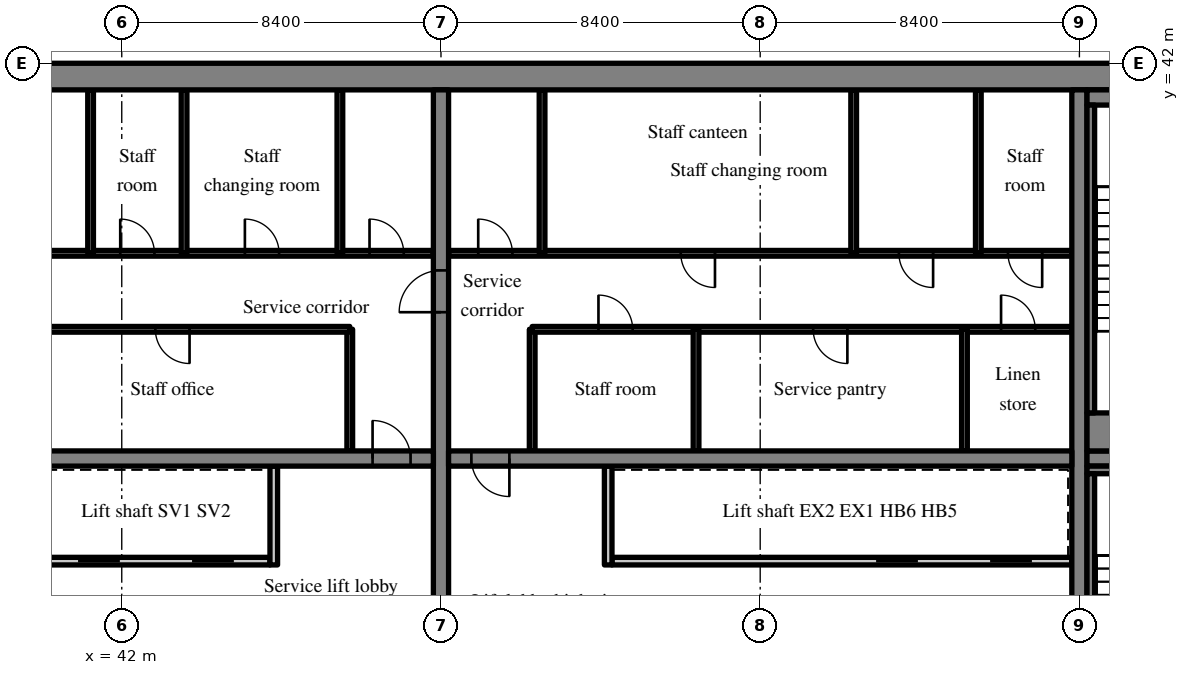
"""IFC4 building model, lengths in metres.
Left out: names, types, materials, properties, quantities, classifications, styles, units other than length and angle.
Written with IfcOpenShell. Run it as: python <this file> out.ifc"""

import sys

from ifc_helpers import new_model, si_unit, direction, frame, frame_2d, origin, place, context, subcontext, project, spatial, rectangle, extrude, source, transform, mapped, element, fill, save


model = new_model("IFC4")
c1 = context("Model", 3, precision=1e-05, world=origin(), true_north=direction((0.0, 1.0)))
c2 = subcontext(c1, "Body", "Model", "MODEL_VIEW")
j1 = project(units=[si_unit("LENGTHUNIT", "METRE"), si_unit("PLANEANGLEUNIT", "RADIAN")], contexts=[c1])
p1 = place(None, origin())
s1 = spatial("IfcSite", under=j1, at=p1, CompositionType="ELEMENT")
p2 = place(p1, origin())
s2 = spatial("IfcBuilding", under=s1, at=p2, CompositionType="ELEMENT")
p3 = place(p2, frame((0.0, 0.0, 166.8)))
s3 = spatial("IfcBuildingStorey", under=s2, at=p3, CompositionType="ELEMENT", Elevation=166.8)
m1 = source(origin(), c2, "Body", "SweptSolid", [
    extrude(rectangle(XDim=50.4, YDim=0.7, at=frame_2d((25.2, 0.0))), origin(), (0.0, 0.0, 1.0), 3.52),
])
p4 = place(p3, frame((25.2, 41.65, 0.0), z_axis=(0.0, 0.0, 1.0), x_axis=(1.0, 0.0, 0.0)))
e1 = element("IfcWall", 1, at=p4, inside=s3, PredefinedType="SHEAR", context=c2, shape_type="MappedRepresentation", body=[
    mapped(m1, transform((0.0, 0.0, 0.0), scale=1.0)),
])
m2 = source(origin(), c2, "Body", "SweptSolid", [
    extrude(rectangle(XDim=18.6, YDim=0.4, at=frame_2d((9.3, 0.0))), origin(), (0.0, 0.0, 1.0), 3.52),
])
p5 = place(p3, frame((50.4, 22.7, 0.0), z_axis=(0.0, 0.0, 1.0), x_axis=(0.0, 1.0, 0.0)))
e2 = element("IfcWall", 2, at=p5, inside=s3, PredefinedType="SHEAR", context=c2, shape_type="MappedRepresentation", body=[
    mapped(m2, transform((0.0, 0.0, 0.0), scale=1.0)),
])
m3 = source(origin(), c2, "Body", "SweptSolid", [
    extrude(rectangle(XDim=1.1, YDim=2.1, at=frame_2d((0.55, 1.05))), frame((0.0, 0.21, 0.0), z_axis=(0.0, -1.0, 0.0), x_axis=(1.0, 0.0, 0.0)), (0.0, 0.0, 1.0), 0.42),
])
p6 = place(p5, frame((12.75, 0.0, 0.0)))
e3 = element("IfcOpeningElement", 3, at=p6, cuts=e2, PredefinedType="OPENING", context=c2, shape_type="MappedRepresentation", body=[
    mapped(m3, transform((0.0, 0.0, 0.0), scale=1.0)),
])
p7 = place(p3, frame((67.2, 22.7, 0.0), z_axis=(0.0, 0.0, 1.0), x_axis=(0.0, 1.0, 0.0)))
e4 = element("IfcWall", 4, at=p7, inside=s3, PredefinedType="SHEAR", context=c2, shape_type="MappedRepresentation", body=[
    mapped(m2, transform((0.0, 0.0, 0.0), scale=1.0)),
])
m4 = source(origin(), c2, "Body", "SweptSolid", [
    extrude(rectangle(XDim=16.4, YDim=0.4, at=frame_2d((8.2, 0.0))), origin(), (0.0, 0.0, 1.0), 3.52),
])
p8 = place(p3, frame((33.8, 31.6, 0.0), z_axis=(0.0, 0.0, 1.0), x_axis=(1.0, 0.0, 0.0)))
e5 = element("IfcWall", 5, at=p8, inside=s3, PredefinedType="SHEAR", context=c2, shape_type="MappedRepresentation", body=[
    mapped(m4, transform((0.0, 0.0, 0.0), scale=1.0)),
])
m5 = source(origin(), c2, "Body", "SweptSolid", [
    extrude(rectangle(XDim=1.0, YDim=2.1, at=frame_2d((0.5, 1.05))), frame((0.0, 0.21, 0.0), z_axis=(0.0, -1.0, 0.0), x_axis=(1.0, 0.0, 0.0)), (0.0, 0.0, 1.0), 0.42),
])
p9 = place(p8, frame((14.8, 0.0, 0.0)))
e6 = element("IfcOpeningElement", 6, at=p9, cuts=e5, PredefinedType="OPENING", context=c2, shape_type="MappedRepresentation", body=[
    mapped(m5, transform((0.0, 0.0, 0.0), scale=1.0)),
])
p10 = place(p3, frame((50.6, 31.6, 0.0), z_axis=(0.0, 0.0, 1.0), x_axis=(1.0, 0.0, 0.0)))
e7 = element("IfcWall", 7, at=p10, inside=s3, PredefinedType="SHEAR", context=c2, shape_type="MappedRepresentation", body=[
    mapped(m4, transform((0.0, 0.0, 0.0), scale=1.0)),
])
p11 = place(p10, frame((0.6, 0.0, 0.0)))
e8 = element("IfcOpeningElement", 8, at=p11, cuts=e7, PredefinedType="OPENING", context=c2, shape_type="MappedRepresentation", body=[
    mapped(m5, transform((0.0, 0.0, 0.0), scale=1.0)),
])
m6 = source(origin(), c2, "Body", "SweptSolid", [
    extrude(rectangle(XDim=7.5, YDim=0.4, at=frame_2d((3.75, 0.0))), origin(), (0.0, 0.0, 1.0), 3.52),
])
p12 = place(p3, frame((67.4, 31.6, 0.0), z_axis=(0.0, 0.0, 1.0), x_axis=(1.0, 0.0, 0.0)))
e9 = element("IfcWall", 9, at=p12, inside=s3, PredefinedType="SHEAR", context=c2, shape_type="MappedRepresentation", body=[
    mapped(m6, transform((0.0, 0.0, 0.0), scale=1.0)),
])
p13 = place(p12, frame((5.725, 0.0, 0.0)))
e10 = element("IfcOpeningElement", 10, at=p13, cuts=e9, PredefinedType="OPENING", context=c2, shape_type="MappedRepresentation", body=[
    mapped(m3, transform((0.0, 0.0, 0.0), scale=1.0)),
])
m7 = source(origin(), c2, "Body", "SweptSolid", [
    extrude(rectangle(XDim=6.0, YDim=0.2, at=frame_2d((3.0, 0.0))), origin(), (0.0, 0.0, 1.0), 3.52),
])
p14 = place(p3, frame((39.9, 28.9, 0.0), z_axis=(0.0, 0.0, 1.0), x_axis=(1.0, 0.0, 0.0)))
e11 = element("IfcWall", 11, at=p14, inside=s3, PredefinedType="SOLIDWALL", context=c2, shape_type="MappedRepresentation", body=[
    mapped(m7, transform((0.0, 0.0, 0.0), scale=1.0)),
])
m8 = source(origin(), c2, "Body", "SweptSolid", [
    extrude(rectangle(XDim=1.1, YDim=2.1, at=frame_2d((0.55, 1.05))), frame((0.0, 0.11, 0.0), z_axis=(0.0, -1.0, 0.0), x_axis=(1.0, 0.0, 0.0)), (0.0, 0.0, 1.0), 0.22),
])
p15 = place(p14, frame((0.95, 0.0, 0.0)))
e12 = element("IfcOpeningElement", 12, at=p15, cuts=e11, PredefinedType="OPENING", context=c2, shape_type="MappedRepresentation", body=[
    mapped(m8, transform((0.0, 0.0, 0.0), scale=1.0)),
])
p16 = place(p14, frame((3.95, 0.0, 0.0)))
e13 = element("IfcOpeningElement", 13, at=p16, cuts=e11, PredefinedType="OPENING", context=c2, shape_type="MappedRepresentation", body=[
    mapped(m8, transform((0.0, 0.0, 0.0), scale=1.0)),
])
m9 = source(origin(), c2, "Body", "SweptSolid", [
    extrude(rectangle(XDim=2.6, YDim=0.2, at=frame_2d((1.3, 0.0))), origin(), (0.0, 0.0, 1.0), 3.52),
])
p17 = place(p3, frame((46.0, 28.8, 0.0), z_axis=(0.0, 0.0, 1.0), x_axis=(0.0, 1.0, 0.0)))
e14 = element("IfcWall", 14, at=p17, inside=s3, PredefinedType="SOLIDWALL", context=c2, shape_type="MappedRepresentation", body=[
    mapped(m9, transform((0.0, 0.0, 0.0), scale=1.0)),
])
m10 = source(origin(), c2, "Body", "SweptSolid", [
    extrude(rectangle(XDim=3.2, YDim=0.15, at=frame_2d((1.6, 0.0))), origin(), (0.0, 0.0, 1.0), 3.52),
])
p18 = place(p3, frame((48.0, 31.8, 0.0), z_axis=(0.0, 0.0, 1.0), x_axis=(0.0, 1.0, 0.0)))
e15 = element("IfcWall", 15, at=p18, inside=s3, PredefinedType="PARTITIONING", context=c2, shape_type="MappedRepresentation", body=[
    mapped(m10, transform((0.0, 0.0, 0.0), scale=1.0)),
])
m11 = source(origin(), c2, "Body", "SweptSolid", [
    extrude(rectangle(XDim=14.2, YDim=0.15, at=frame_2d((7.1, 0.0))), origin(), (0.0, 0.0, 1.0), 3.52),
])
p19 = place(p3, frame((33.8, 35.0, 0.0), z_axis=(0.0, 0.0, 1.0), x_axis=(1.0, 0.0, 0.0)))
e16 = element("IfcWall", 16, at=p19, inside=s3, PredefinedType="PARTITIONING", context=c2, shape_type="MappedRepresentation", body=[
    mapped(m11, transform((0.0, 0.0, 0.0), scale=1.0)),
])
m12 = source(origin(), c2, "Body", "SweptSolid", [
    extrude(rectangle(XDim=0.9, YDim=2.1, at=frame_2d((0.45, 1.05))), frame((0.0, 0.085, 0.0), z_axis=(0.0, -1.0, 0.0), x_axis=(1.0, 0.0, 0.0)), (0.0, 0.0, 1.0), 0.17),
])
p20 = place(p19, frame((2.022, 0.0, 0.0)))
e17 = element("IfcOpeningElement", 17, at=p20, cuts=e16, PredefinedType="OPENING", context=c2, shape_type="MappedRepresentation", body=[
    mapped(m12, transform((0.0, 0.0, 0.0), scale=1.0)),
])
p21 = place(p19, frame((9.084, 0.0, 0.0)))
e18 = element("IfcOpeningElement", 18, at=p21, cuts=e16, PredefinedType="OPENING", context=c2, shape_type="MappedRepresentation", body=[
    mapped(m12, transform((0.0, 0.0, 0.0), scale=1.0)),
])
m13 = source(origin(), c2, "Body", "SweptSolid", [
    extrude(rectangle(XDim=16.4, YDim=0.15, at=frame_2d((8.2, 0.0))), origin(), (0.0, 0.0, 1.0), 3.52),
])
p22 = place(p3, frame((33.8, 37.0, 0.0), z_axis=(0.0, 0.0, 1.0), x_axis=(1.0, 0.0, 0.0)))
e19 = element("IfcWall", 19, at=p22, inside=s3, PredefinedType="PARTITIONING", context=c2, shape_type="MappedRepresentation", body=[
    mapped(m13, transform((0.0, 0.0, 0.0), scale=1.0)),
])
p23 = place(p22, frame((3.24, 0.0, 0.0)))
e20 = element("IfcOpeningElement", 20, at=p23, cuts=e19, PredefinedType="OPENING", context=c2, shape_type="MappedRepresentation", body=[
    mapped(m12, transform((0.0, 0.0, 0.0), scale=1.0)),
])
p24 = place(p22, frame((8.16, 0.0, 0.0)))
e21 = element("IfcOpeningElement", 21, at=p24, cuts=e19, PredefinedType="OPENING", context=c2, shape_type="MappedRepresentation", body=[
    mapped(m12, transform((0.0, 0.0, 0.0), scale=1.0)),
])
p25 = place(p22, frame((11.44, 0.0, 0.0)))
e22 = element("IfcOpeningElement", 22, at=p25, cuts=e19, PredefinedType="OPENING", context=c2, shape_type="MappedRepresentation", body=[
    mapped(m12, transform((0.0, 0.0, 0.0), scale=1.0)),
])
p26 = place(p22, frame((14.72, 0.0, 0.0)))
e23 = element("IfcOpeningElement", 23, at=p26, cuts=e19, PredefinedType="OPENING", context=c2, shape_type="MappedRepresentation", body=[
    mapped(m12, transform((0.0, 0.0, 0.0), scale=1.0)),
])
m14 = source(origin(), c2, "Body", "SweptSolid", [
    extrude(rectangle(XDim=4.3, YDim=0.15, at=frame_2d((2.15, 0.0))), origin(), (0.0, 0.0, 1.0), 3.52),
])
for number, where, z_axis, x_axis in (
    (24, (41.18, 37.0, 0.0), (0.0, 0.0, 1.0), (0.0, 1.0, 0.0)),
    (25, (43.64, 37.0, 0.0), (0.0, 0.0, 1.0), (0.0, 1.0, 0.0)),
    (26, (47.74, 37.0, 0.0), (0.0, 0.0, 1.0), (0.0, 1.0, 0.0)),
):
    element("IfcWall", number, at=place(p3, frame(where, z_axis=z_axis, x_axis=x_axis)), inside=s3, PredefinedType="PARTITIONING", context=c2, shape_type="MappedRepresentation", body=[
        mapped(m14, transform((0.0, 0.0, 0.0), scale=1.0)),
    ])
m15 = source(origin(), c2, "Body", "SweptSolid", [
    extrude(rectangle(XDim=12.1, YDim=0.2, at=frame_2d((6.05, 0.0))), origin(), (0.0, 0.0, 1.0), 3.52),
])
p27 = place(p3, frame((67.0, 28.9, 0.0), z_axis=(0.0, 0.0, 1.0), x_axis=(-1.0, 0.0, 0.0)))
e27 = element("IfcWall", 27, at=p27, inside=s3, PredefinedType="SOLIDWALL", context=c2, shape_type="MappedRepresentation", body=[
    mapped(m15, transform((0.0, 0.0, 0.0), scale=1.0)),
])
p28 = place(p27, frame((1.05, 0.0, 0.0)))
e28 = element("IfcOpeningElement", 28, at=p28, cuts=e27, PredefinedType="OPENING", context=c2, shape_type="MappedRepresentation", body=[
    mapped(m8, transform((0.0, 0.0, 0.0), scale=1.0)),
])
p29 = place(p27, frame((4.05, 0.0, 0.0)))
e29 = element("IfcOpeningElement", 29, at=p29, cuts=e27, PredefinedType="OPENING", context=c2, shape_type="MappedRepresentation", body=[
    mapped(m8, transform((0.0, 0.0, 0.0), scale=1.0)),
])
p30 = place(p3, frame((54.8, 28.8, 0.0), z_axis=(0.0, 0.0, 1.0), x_axis=(0.0, 1.0, 0.0)))
e30 = element("IfcWall", 30, at=p30, inside=s3, PredefinedType="SOLIDWALL", context=c2, shape_type="MappedRepresentation", body=[
    mapped(m9, transform((0.0, 0.0, 0.0), scale=1.0)),
])
p31 = place(p3, frame((52.8, 31.8, 0.0), z_axis=(0.0, 0.0, 1.0), x_axis=(0.0, 1.0, 0.0)))
e31 = element("IfcWall", 31, at=p31, inside=s3, PredefinedType="PARTITIONING", context=c2, shape_type="MappedRepresentation", body=[
    mapped(m10, transform((0.0, 0.0, 0.0), scale=1.0)),
])
p32 = place(p3, frame((67.0, 35.0, 0.0), z_axis=(0.0, 0.0, 1.0), x_axis=(-1.0, 0.0, 0.0)))
e32 = element("IfcWall", 32, at=p32, inside=s3, PredefinedType="PARTITIONING", context=c2, shape_type="MappedRepresentation", body=[
    mapped(m11, transform((0.0, 0.0, 0.0), scale=1.0)),
])
p33 = place(p32, frame((0.962, 0.0, 0.0)))
e33 = element("IfcOpeningElement", 33, at=p33, cuts=e32, PredefinedType="OPENING", context=c2, shape_type="MappedRepresentation", body=[
    mapped(m12, transform((0.0, 0.0, 0.0), scale=1.0)),
])
p34 = place(p32, frame((5.906, 0.0, 0.0)))
e34 = element("IfcOpeningElement", 34, at=p34, cuts=e32, PredefinedType="OPENING", context=c2, shape_type="MappedRepresentation", body=[
    mapped(m12, transform((0.0, 0.0, 0.0), scale=1.0)),
])
p35 = place(p32, frame((11.556, 0.0, 0.0)))
e35 = element("IfcOpeningElement", 35, at=p35, cuts=e32, PredefinedType="OPENING", context=c2, shape_type="MappedRepresentation", body=[
    mapped(m12, transform((0.0, 0.0, 0.0), scale=1.0)),
])
p36 = place(p3, frame((67.0, 37.0, 0.0), z_axis=(0.0, 0.0, 1.0), x_axis=(-1.0, 0.0, 0.0)))
e36 = element("IfcWall", 36, at=p36, inside=s3, PredefinedType="PARTITIONING", context=c2, shape_type="MappedRepresentation", body=[
    mapped(m13, transform((0.0, 0.0, 0.0), scale=1.0)),
])
p37 = place(p36, frame((0.78, 0.0, 0.0)))
e37 = element("IfcOpeningElement", 37, at=p37, cuts=e36, PredefinedType="OPENING", context=c2, shape_type="MappedRepresentation", body=[
    mapped(m12, transform((0.0, 0.0, 0.0), scale=1.0)),
])
p38 = place(p36, frame((3.65, 0.0, 0.0)))
e38 = element("IfcOpeningElement", 38, at=p38, cuts=e36, PredefinedType="OPENING", context=c2, shape_type="MappedRepresentation", body=[
    mapped(m12, transform((0.0, 0.0, 0.0), scale=1.0)),
])
p39 = place(p36, frame((9.39, 0.0, 0.0)))
e39 = element("IfcOpeningElement", 39, at=p39, cuts=e36, PredefinedType="OPENING", context=c2, shape_type="MappedRepresentation", body=[
    mapped(m12, transform((0.0, 0.0, 0.0), scale=1.0)),
])
p40 = place(p36, frame((14.72, 0.0, 0.0)))
e40 = element("IfcOpeningElement", 40, at=p40, cuts=e36, PredefinedType="OPENING", context=c2, shape_type="MappedRepresentation", body=[
    mapped(m12, transform((0.0, 0.0, 0.0), scale=1.0)),
])
for number, where, z_axis, x_axis in (
    (41, (64.175, 31.8, 0.0), (0.0, 0.0, 1.0), (0.0, 1.0, 0.0)),
    (42, (57.112, 31.8, 0.0), (0.0, 0.0, 1.0), (0.0, 1.0, 0.0)),
):
    element("IfcWall", number, at=place(p3, frame(where, z_axis=z_axis, x_axis=x_axis)), inside=s3, PredefinedType="PARTITIONING", context=c2, shape_type="MappedRepresentation", body=[
        mapped(m10, transform((0.0, 0.0, 0.0), scale=1.0)),
    ])
for number, where, z_axis, x_axis in (
    (43, (64.54, 37.0, 0.0), (0.0, 0.0, 1.0), (0.0, 1.0, 0.0)),
    (44, (61.26, 37.0, 0.0), (0.0, 0.0, 1.0), (0.0, 1.0, 0.0)),
    (45, (53.06, 37.0, 0.0), (0.0, 0.0, 1.0), (0.0, 1.0, 0.0)),
):
    element("IfcWall", number, at=place(p3, frame(where, z_axis=z_axis, x_axis=x_axis)), inside=s3, PredefinedType="PARTITIONING", context=c2, shape_type="MappedRepresentation", body=[
        mapped(m14, transform((0.0, 0.0, 0.0), scale=1.0)),
    ])
m16 = source(origin(), c2, "Body", "SweptSolid", [
    extrude(rectangle(XDim=4.85, YDim=0.2, at=frame_2d((2.425, 0.0))), origin(), (0.0, 0.0, 1.0), 3.52),
])
p41 = place(p3, frame((67.4, 31.3, 0.0), z_axis=(0.0, 0.0, 1.0), x_axis=(1.0, 0.0, 0.0)))
e46 = element("IfcWall", 46, at=p41, inside=s3, PredefinedType="SOLIDWALL", context=c2, shape_type="MappedRepresentation", body=[
    mapped(m16, transform((0.0, 0.0, 0.0), scale=1.0)),
])
m17 = source(origin(), c2, "Body", "SweptSolid", [
    extrude(rectangle(XDim=8.1, YDim=0.2, at=frame_2d((4.05, 0.0))), origin(), (0.0, 0.0, 1.0), 3.52),
])
p42 = place(p3, frame((67.5, 23.1, 0.0), z_axis=(0.0, 0.0, 1.0), x_axis=(0.0, 1.0, 0.0)))
e47 = element("IfcWall", 47, at=p42, inside=s3, PredefinedType="SOLIDWALL", context=c2, shape_type="MappedRepresentation", body=[
    mapped(m17, transform((0.0, 0.0, 0.0), scale=1.0)),
])
m18 = source(origin(), c2, "Body", "SweptSolid", [
    extrude(rectangle(XDim=4.85, YDim=0.4, at=frame_2d((2.425, 0.0))), origin(), (0.0, 0.0, 1.0), 3.52),
])
p43 = place(p3, frame((67.4, 41.1, 0.0), z_axis=(0.0, 0.0, 1.0), x_axis=(1.0, 0.0, 0.0)))
e48 = element("IfcWall", 48, at=p43, inside=s3, PredefinedType="SOLIDWALL", context=c2, shape_type="MappedRepresentation", body=[
    mapped(m18, transform((0.0, 0.0, 0.0), scale=1.0)),
])
m19 = source(origin(), c2, "Body", "SweptSolid", [
    extrude(rectangle(XDim=4.85, YDim=1.0, at=frame_2d((2.425, 0.0))), origin(), (0.0, 0.0, 1.0), 3.52),
])
p44 = place(p3, frame((67.4, 32.3, 0.0), z_axis=(0.0, 0.0, 1.0), x_axis=(1.0, 0.0, 0.0)))
e49 = element("IfcWall", 49, at=p44, inside=s3, PredefinedType="SOLIDWALL", context=c2, shape_type="MappedRepresentation", body=[
    mapped(m19, transform((0.0, 0.0, 0.0), scale=1.0)),
])
p45 = place(p3, frame((67.5, 32.8, 0.0), z_axis=(0.0, 0.0, 1.0), x_axis=(0.0, 1.0, 0.0)))
e50 = element("IfcWall", 50, at=p45, inside=s3, PredefinedType="SOLIDWALL", context=c2, shape_type="MappedRepresentation", body=[
    mapped(m17, transform((0.0, 0.0, 0.0), scale=1.0)),
])
m20 = source(origin(), c2, "Body", "SweptSolid", [
    extrude(rectangle(XDim=1.0, YDim=2.1, at=frame_2d((0.5, 1.05))), frame((0.0, 0.025, 0.0), z_axis=(0.0, -1.0, 0.0), x_axis=(1.0, 0.0, 0.0)), (0.0, 0.0, 1.0), 0.05),
])
p46 = place(p9, origin())
e51 = element("IfcDoor", 51, at=p46, inside=s3, OperationType="SINGLE_SWING_LEFT", PredefinedType="DOOR", context=c2, shape_type="MappedRepresentation", body=[
    mapped(m20, transform((0.0, 0.0, 0.0), scale=1.0)),
])
fill(e6, e51)
m21 = source(origin(), c2, "Body", "SweptSolid", [
    extrude(rectangle(XDim=1.1, YDim=2.1, at=frame_2d((0.55, 1.05))), frame((0.0, 0.025, 0.0), z_axis=(0.0, -1.0, 0.0), x_axis=(1.0, 0.0, 0.0)), (0.0, 0.0, 1.0), 0.05),
])
p47 = place(p15, origin())
e52 = element("IfcDoor", 52, at=p47, inside=s3, OperationType="SLIDING_TO_LEFT", PredefinedType="DOOR", context=c2, shape_type="MappedRepresentation", body=[
    mapped(m21, transform((0.0, 0.0, 0.0), scale=1.0)),
])
fill(e12, e52)
p48 = place(p16, origin())
e53 = element("IfcDoor", 53, at=p48, inside=s3, OperationType="SLIDING_TO_RIGHT", PredefinedType="DOOR", context=c2, shape_type="MappedRepresentation", body=[
    mapped(m21, transform((0.0, 0.0, 0.0), scale=1.0)),
])
fill(e13, e53)
m22 = source(origin(), c2, "Body", "SweptSolid", [
    extrude(rectangle(XDim=0.9, YDim=2.1, at=frame_2d((0.45, 1.05))), frame((0.0, 0.025, 0.0), z_axis=(0.0, -1.0, 0.0), x_axis=(1.0, 0.0, 0.0)), (0.0, 0.0, 1.0), 0.05),
])
p49 = place(p21, origin())
e54 = element("IfcDoor", 54, at=p49, inside=s3, OperationType="SINGLE_SWING_RIGHT", PredefinedType="DOOR", context=c2, shape_type="MappedRepresentation", body=[
    mapped(m22, transform((0.0, 0.0, 0.0), scale=1.0)),
])
fill(e18, e54)
p50 = place(p24, origin())
e55 = element("IfcDoor", 55, at=p50, inside=s3, OperationType="SINGLE_SWING_LEFT", PredefinedType="DOOR", context=c2, shape_type="MappedRepresentation", body=[
    mapped(m22, transform((0.0, 0.0, 0.0), scale=1.0)),
])
fill(e21, e55)
p51 = place(p25, origin())
e56 = element("IfcDoor", 56, at=p51, inside=s3, OperationType="SINGLE_SWING_LEFT", PredefinedType="DOOR", context=c2, shape_type="MappedRepresentation", body=[
    mapped(m22, transform((0.0, 0.0, 0.0), scale=1.0)),
])
fill(e22, e56)
p52 = place(p26, origin())
e57 = element("IfcDoor", 57, at=p52, inside=s3, OperationType="SINGLE_SWING_LEFT", PredefinedType="DOOR", context=c2, shape_type="MappedRepresentation", body=[
    mapped(m22, transform((0.0, 0.0, 0.0), scale=1.0)),
])
fill(e23, e57)
p53 = place(p11, origin())
e58 = element("IfcDoor", 58, at=p53, inside=s3, OperationType="SINGLE_SWING_RIGHT", PredefinedType="DOOR", context=c2, shape_type="MappedRepresentation", body=[
    mapped(m20, transform((0.0, 0.0, 0.0), scale=1.0)),
])
fill(e8, e58)
p54 = place(p28, origin())
e59 = element("IfcDoor", 59, at=p54, inside=s3, OperationType="SLIDING_TO_RIGHT", PredefinedType="DOOR", context=c2, shape_type="MappedRepresentation", body=[
    mapped(m21, transform((0.0, 0.0, 0.0), scale=1.0)),
])
fill(e28, e59)
p55 = place(p29, origin())
e60 = element("IfcDoor", 60, at=p55, inside=s3, OperationType="SLIDING_TO_LEFT", PredefinedType="DOOR", context=c2, shape_type="MappedRepresentation", body=[
    mapped(m21, transform((0.0, 0.0, 0.0), scale=1.0)),
])
fill(e29, e60)
p56 = place(p33, origin())
e61 = element("IfcDoor", 61, at=p56, inside=s3, OperationType="SINGLE_SWING_RIGHT", PredefinedType="DOOR", context=c2, shape_type="MappedRepresentation", body=[
    mapped(m22, transform((0.0, 0.0, 0.0), scale=1.0)),
])
fill(e33, e61)
p57 = place(p34, origin())
e62 = element("IfcDoor", 62, at=p57, inside=s3, OperationType="SINGLE_SWING_LEFT", PredefinedType="DOOR", context=c2, shape_type="MappedRepresentation", body=[
    mapped(m22, transform((0.0, 0.0, 0.0), scale=1.0)),
])
fill(e34, e62)
p58 = place(p35, origin())
e63 = element("IfcDoor", 63, at=p58, inside=s3, OperationType="SINGLE_SWING_RIGHT", PredefinedType="DOOR", context=c2, shape_type="MappedRepresentation", body=[
    mapped(m22, transform((0.0, 0.0, 0.0), scale=1.0)),
])
fill(e35, e63)
p59 = place(p37, origin())
e64 = element("IfcDoor", 64, at=p59, inside=s3, OperationType="SINGLE_SWING_LEFT", PredefinedType="DOOR", context=c2, shape_type="MappedRepresentation", body=[
    mapped(m22, transform((0.0, 0.0, 0.0), scale=1.0)),
])
fill(e37, e64)
p60 = place(p38, origin())
e65 = element("IfcDoor", 65, at=p60, inside=s3, OperationType="SINGLE_SWING_LEFT", PredefinedType="DOOR", context=c2, shape_type="MappedRepresentation", body=[
    mapped(m22, transform((0.0, 0.0, 0.0), scale=1.0)),
])
fill(e38, e65)
p61 = place(p39, origin())
e66 = element("IfcDoor", 66, at=p61, inside=s3, OperationType="SINGLE_SWING_LEFT", PredefinedType="DOOR", context=c2, shape_type="MappedRepresentation", body=[
    mapped(m22, transform((0.0, 0.0, 0.0), scale=1.0)),
])
fill(e39, e66)
p62 = place(p40, origin())
e67 = element("IfcDoor", 67, at=p62, inside=s3, OperationType="SINGLE_SWING_RIGHT", PredefinedType="DOOR", context=c2, shape_type="MappedRepresentation", body=[
    mapped(m22, transform((0.0, 0.0, 0.0), scale=1.0)),
])
fill(e40, e67)
p63 = place(p6, origin())
e68 = element("IfcDoor", 68, at=p63, inside=s3, OperationType="SINGLE_SWING_LEFT", PredefinedType="DOOR", context=c2, shape_type="MappedRepresentation", body=[
    mapped(m21, transform((0.0, 0.0, 0.0), scale=1.0)),
])
fill(e3, e68)
save(model, sys.argv[1])
